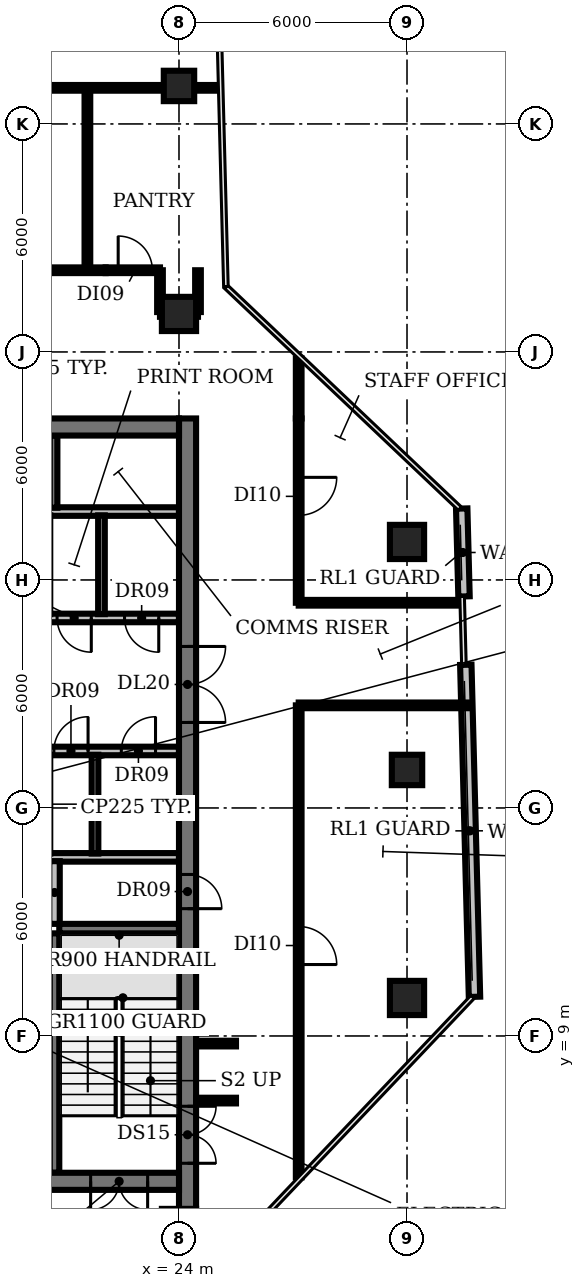
"""IFC4 building model, lengths in metres.
Left out: names, types, materials, properties, quantities, classifications, styles, units other than length and angle.
Written with IfcOpenShell. Run it as: python <this file> out.ifc"""

import sys

from ifc_helpers import new_model, si_unit, direction, frame, frame_2d, origin, origin_2d, place, context, subcontext, project, spatial, rectangle, circle, extrude, element, fill, save


model = new_model("IFC4")
c1 = context("Model", 3, precision=1e-05, world=origin(), true_north=direction((0.0, 1.0)))
c2 = subcontext(c1, "Body", "Model", "MODEL_VIEW")
j1 = project(units=[si_unit("LENGTHUNIT", "METRE"), si_unit("PLANEANGLEUNIT", "RADIAN")], contexts=[c1])
p1 = place(None, origin())
s1 = spatial("IfcSite", under=j1, at=p1, CompositionType="ELEMENT")
p2 = place(p1, origin())
s2 = spatial("IfcBuilding", under=s1, at=p2, CompositionType="ELEMENT")
p3 = place(p2, frame((0.0, 0.0, 222.2)))
s3 = spatial("IfcBuildingStorey", under=s2, at=p3, CompositionType="ELEMENT", Elevation=222.2)
p4 = place(p3, frame((24.0, 28.0, 0.0), z_axis=(0.0, 0.0, 1.0), x_axis=(1.0, 0.0, 0.0)))
e1 = element("IfcColumn", 1, at=p4, inside=s3, PredefinedType="COLUMN", context=c2, shape_type="SweptSolid", body=[
    extrude(circle(Radius=0.45, at=origin_2d()), origin(), (0.0, 0.0, 1.0), 3.85),
])
p5 = place(p3, frame((24.0, 34.0, 0.0), z_axis=(0.0, 0.0, 1.0), x_axis=(1.0, 0.0, 0.0)))
e2 = element("IfcColumn", 2, at=p5, inside=s3, PredefinedType="COLUMN", context=c2, shape_type="SweptSolid", body=[
    extrude(rectangle(XDim=0.8, YDim=0.8, at=origin_2d()), origin(), (0.0, 0.0, 1.0), 3.85),
])
p6 = place(p3, frame((30.0, 10.0, 0.0), z_axis=(0.0, 0.0, 1.0), x_axis=(1.0, 0.0, 0.0)))
e3 = element("IfcColumn", 3, at=p6, inside=s3, PredefinedType="COLUMN", context=c2, shape_type="SweptSolid", body=[
    extrude(circle(Radius=0.45, at=origin_2d()), origin(), (0.0, 0.0, 1.0), 3.85),
])
p7 = place(p3, frame((30.0, 16.0, 0.0), z_axis=(0.0, 0.0, 1.0), x_axis=(1.0, 0.0, 0.0)))
e4 = element("IfcColumn", 4, at=p7, inside=s3, PredefinedType="COLUMN", context=c2, shape_type="SweptSolid", body=[
    extrude(rectangle(XDim=0.8, YDim=0.8, at=origin_2d()), origin(), (0.0, 0.0, 1.0), 3.85),
])
p8 = place(p3, frame((30.0, 22.0, 0.0), z_axis=(0.0, 0.0, 1.0), x_axis=(1.0, 0.0, 0.0)))
e5 = element("IfcColumn", 5, at=p8, inside=s3, PredefinedType="COLUMN", context=c2, shape_type="SweptSolid", body=[
    extrude(circle(Radius=0.45, at=origin_2d()), origin(), (0.0, 0.0, 1.0), 3.85),
])
p9 = place(p3, frame((31.776, 10.03, 0.0), z_axis=(0.0, 0.0, 1.0), x_axis=(-0.026145807667, 0.999658139937, 0.0)))
e6 = element("IfcWall", 6, at=p9, inside=s3, PredefinedType="SOLIDWALL", context=c2, shape_type="SweptSolid", body=[
    extrude(rectangle(XDim=8.74, YDim=0.3, at=frame_2d((4.37, 0.0))), origin(), (0.0, 0.0, 1.0), 3.85),
])
p10 = place(p3, frame((31.5, 20.567, 0.0), z_axis=(0.0, 0.0, 1.0), x_axis=(-0.026173462756, 0.999657416242, 0.0)))
e7 = element("IfcWall", 7, at=p10, inside=s3, PredefinedType="SOLIDWALL", context=c2, shape_type="SweptSolid", body=[
    extrude(rectangle(XDim=2.313, YDim=0.3, at=frame_2d((1.157, 0.0))), origin(), (0.0, 0.0, 1.0), 3.85),
])
p11 = place(p3, frame((20.85, 11.825, 0.0), z_axis=(0.0, 0.0, 1.0), x_axis=(1.0, 0.0, 0.0)))
e8 = element("IfcWall", 8, at=p11, inside=s3, PredefinedType="SHEAR", context=c2, shape_type="SweptSolid", body=[
    extrude(rectangle(XDim=3.15, YDim=0.25, at=frame_2d((1.575, 0.0))), origin(), (0.0, 0.0, 1.0), 3.85),
])
p12 = place(p3, frame((16.6, 13.7, 0.0), z_axis=(0.0, 0.0, 1.0), x_axis=(1.0, 0.0, 0.0)))
e9 = element("IfcWall", 9, at=p12, inside=s3, PredefinedType="PARTITIONING", context=c2, shape_type="SweptSolid", body=[
    extrude(rectangle(XDim=7.4, YDim=0.225, at=frame_2d((3.7, 0.0))), origin(), (0.0, 0.0, 1.0), 3.85),
])
p13 = place(p3, frame((9.4, 16.5, 0.0), z_axis=(0.0, 0.0, 1.0), x_axis=(1.0, 0.0, 0.0)))
e10 = element("IfcWall", 10, at=p13, inside=s3, PredefinedType="PARTITIONING", context=c2, shape_type="SweptSolid", body=[
    extrude(rectangle(XDim=14.6, YDim=0.225, at=frame_2d((7.3, 0.0))), origin(), (0.0, 0.0, 1.0), 3.85),
])
p14 = place(p13, frame((1.9, 0.0, 0.0)))
e11 = element("IfcOpeningElement", 11, at=p14, cuts=e10, PredefinedType="OPENING", context=c2, shape_type="SweptSolid", body=[
    extrude(rectangle(XDim=1.0, YDim=2.1, at=frame_2d((0.5, 1.05))), frame((0.0, 0.123, 0.0), z_axis=(0.0, -1.0, 0.0), x_axis=(1.0, 0.0, 0.0)), (0.0, 0.0, 1.0), 0.245),
])
p15 = place(p13, frame((7.475, 0.0, 0.0)))
e12 = element("IfcOpeningElement", 12, at=p15, cuts=e10, PredefinedType="OPENING", context=c2, shape_type="SweptSolid", body=[
    extrude(rectangle(XDim=1.0, YDim=2.1, at=frame_2d((0.5, 1.05))), frame((0.0, 0.123, 0.0), z_axis=(0.0, -1.0, 0.0), x_axis=(1.0, 0.0, 0.0)), (0.0, 0.0, 1.0), 0.245),
])
p16 = place(p13, frame((11.308, 0.0, 0.0)))
e13 = element("IfcOpeningElement", 13, at=p16, cuts=e10, PredefinedType="OPENING", context=c2, shape_type="SweptSolid", body=[
    extrude(rectangle(XDim=0.9, YDim=2.1, at=frame_2d((0.45, 1.05))), frame((0.0, 0.123, 0.0), z_axis=(0.0, -1.0, 0.0), x_axis=(1.0, 0.0, 0.0)), (0.0, 0.0, 1.0), 0.245),
])
p17 = place(p13, frame((13.083, 0.0, 0.0)))
e14 = element("IfcOpeningElement", 14, at=p17, cuts=e10, PredefinedType="OPENING", context=c2, shape_type="SweptSolid", body=[
    extrude(rectangle(XDim=0.9, YDim=2.1, at=frame_2d((0.45, 1.05))), frame((0.0, 0.123, 0.0), z_axis=(0.0, -1.0, 0.0), x_axis=(1.0, 0.0, 0.0)), (0.0, 0.0, 1.0), 0.245),
])
p18 = place(p3, frame((24.0, 20.0, 0.0), z_axis=(0.0, 0.0, 1.0), x_axis=(-1.0, 0.0, 0.0)))
e15 = element("IfcWall", 15, at=p18, inside=s3, PredefinedType="PARTITIONING", context=c2, shape_type="SweptSolid", body=[
    extrude(rectangle(XDim=14.6, YDim=0.225, at=frame_2d((7.3, 0.0))), origin(), (0.0, 0.0, 1.0), 3.85),
])
p19 = place(p18, frame((12.75, 0.0, 0.0)))
e16 = element("IfcOpeningElement", 16, at=p19, cuts=e15, PredefinedType="OPENING", context=c2, shape_type="SweptSolid", body=[
    extrude(rectangle(XDim=1.1, YDim=2.1, at=frame_2d((0.55, 1.05))), frame((0.0, 0.123, 0.0), z_axis=(0.0, -1.0, 0.0), x_axis=(1.0, 0.0, 0.0)), (0.0, 0.0, 1.0), 0.245),
])
p20 = place(p18, frame((9.95, 0.0, 0.0)))
e17 = element("IfcOpeningElement", 17, at=p20, cuts=e15, PredefinedType="OPENING", context=c2, shape_type="SweptSolid", body=[
    extrude(rectangle(XDim=1.1, YDim=2.1, at=frame_2d((0.55, 1.05))), frame((0.0, 0.123, 0.0), z_axis=(0.0, -1.0, 0.0), x_axis=(1.0, 0.0, 0.0)), (0.0, 0.0, 1.0), 0.245),
])
p21 = place(p18, frame((7.15, 0.0, 0.0)))
e18 = element("IfcOpeningElement", 18, at=p21, cuts=e15, PredefinedType="OPENING", context=c2, shape_type="SweptSolid", body=[
    extrude(rectangle(XDim=1.1, YDim=2.1, at=frame_2d((0.55, 1.05))), frame((0.0, 0.123, 0.0), z_axis=(0.0, -1.0, 0.0), x_axis=(1.0, 0.0, 0.0)), (0.0, 0.0, 1.0), 0.245),
])
p22 = place(p18, frame((4.35, 0.0, 0.0)))
e19 = element("IfcOpeningElement", 19, at=p22, cuts=e15, PredefinedType="OPENING", context=c2, shape_type="SweptSolid", body=[
    extrude(rectangle(XDim=1.1, YDim=2.1, at=frame_2d((0.55, 1.05))), frame((0.0, 0.123, 0.0), z_axis=(0.0, -1.0, 0.0), x_axis=(1.0, 0.0, 0.0)), (0.0, 0.0, 1.0), 0.245),
])
p23 = place(p18, frame((2.308, 0.0, 0.0)))
e20 = element("IfcOpeningElement", 20, at=p23, cuts=e15, PredefinedType="OPENING", context=c2, shape_type="SweptSolid", body=[
    extrude(rectangle(XDim=0.9, YDim=2.1, at=frame_2d((0.45, 1.05))), frame((0.0, 0.123, 0.0), z_axis=(0.0, -1.0, 0.0), x_axis=(1.0, 0.0, 0.0)), (0.0, 0.0, 1.0), 0.245),
])
p24 = place(p18, frame((0.532, 0.0, 0.0)))
e21 = element("IfcOpeningElement", 21, at=p24, cuts=e15, PredefinedType="OPENING", context=c2, shape_type="SweptSolid", body=[
    extrude(rectangle(XDim=0.9, YDim=2.1, at=frame_2d((0.45, 1.05))), frame((0.0, 0.123, 0.0), z_axis=(0.0, -1.0, 0.0), x_axis=(1.0, 0.0, 0.0)), (0.0, 0.0, 1.0), 0.245),
])
p25 = place(p3, frame((9.4, 22.8, 0.0), z_axis=(0.0, 0.0, 1.0), x_axis=(1.0, 0.0, 0.0)))
e22 = element("IfcWall", 22, at=p25, inside=s3, PredefinedType="PARTITIONING", context=c2, shape_type="SweptSolid", body=[
    extrude(rectangle(XDim=14.6, YDim=0.225, at=frame_2d((7.3, 0.0))), origin(), (0.0, 0.0, 1.0), 3.85),
])
p26 = place(p3, frame((20.7, 22.9, 0.0), z_axis=(0.0, 0.0, 1.0), x_axis=(0.0, 1.0, 0.0)))
e23 = element("IfcWall", 23, at=p26, inside=s3, PredefinedType="SHEAR", context=c2, shape_type="SweptSolid", body=[
    extrude(rectangle(XDim=1.9, YDim=0.2, at=frame_2d((0.95, 0.0))), origin(), (0.0, 0.0, 1.0), 3.85),
])
p27 = place(p3, frame((20.725, 5.4, 0.0), z_axis=(0.0, 0.0, 1.0), x_axis=(0.0, 1.0, 0.0)))
e24 = element("IfcWall", 24, at=p27, inside=s3, PredefinedType="SHEAR", context=c2, shape_type="SweptSolid", body=[
    extrude(rectangle(XDim=6.3, YDim=0.25, at=frame_2d((3.15, 0.0))), origin(), (0.0, 0.0, 1.0), 3.85),
])
p28 = place(p3, frame((20.725, 11.95, 0.0), z_axis=(0.0, 0.0, 1.0), x_axis=(0.0, 1.0, 0.0)))
e25 = element("IfcWall", 25, at=p28, inside=s3, PredefinedType="PARTITIONING", context=c2, shape_type="SweptSolid", body=[
    extrude(rectangle(XDim=1.65, YDim=0.275, at=frame_2d((0.825, 0.0))), origin(), (0.0, 0.0, 1.0), 3.85),
])
for number, where, z_axis, x_axis in (
    (26, (21.79, 13.8, 0.0), (0.0, 0.0, 1.0), (0.0, 1.0, 0.0)),
    (27, (21.96, 20.1, 0.0), (0.0, 0.0, 1.0), (0.0, 1.0, 0.0)),
):
    element("IfcWall", number, at=place(p3, frame(where, z_axis=z_axis, x_axis=x_axis)), inside=s3, PredefinedType="PARTITIONING", context=c2, shape_type="SweptSolid", body=[
        extrude(rectangle(XDim=2.6, YDim=0.175, at=frame_2d((1.3, 0.0))), origin(), (0.0, 0.0, 1.0), 3.85),
    ])
p29 = place(p3, frame((24.225, 25.25, 0.0), z_axis=(0.0, 0.0, 1.0), x_axis=(0.0, -1.0, 0.0)))
e28 = element("IfcWall", 28, at=p29, inside=s3, PredefinedType="SHEAR", context=c2, shape_type="SweptSolid", body=[
    extrude(rectangle(XDim=20.83, YDim=0.45, at=frame_2d((10.415, 0.0))), origin(), (0.0, 0.0, 1.0), 3.85),
])
p30 = place(p29, frame((18.1, 0.0, 0.0)))
e29 = element("IfcOpeningElement", 29, at=p30, cuts=e28, PredefinedType="OPENING", context=c2, shape_type="SweptSolid", body=[
    extrude(rectangle(XDim=1.5, YDim=2.1, at=frame_2d((0.75, 1.05))), frame((0.0, 0.235, 0.0), z_axis=(0.0, -1.0, 0.0), x_axis=(1.0, 0.0, 0.0)), (0.0, 0.0, 1.0), 0.47),
])
p31 = place(p29, frame((12.0, 0.0, 0.0)))
e30 = element("IfcOpeningElement", 30, at=p31, cuts=e28, PredefinedType="OPENING", context=c2, shape_type="SweptSolid", body=[
    extrude(rectangle(XDim=0.9, YDim=2.1, at=frame_2d((0.45, 1.05))), frame((0.0, 0.235, 0.0), z_axis=(0.0, -1.0, 0.0), x_axis=(1.0, 0.0, 0.0)), (0.0, 0.0, 1.0), 0.47),
])
p32 = place(p29, frame((6.0, 0.0, 0.0)))
e31 = element("IfcOpeningElement", 31, at=p32, cuts=e28, PredefinedType="OPENING", context=c2, shape_type="SweptSolid", body=[
    extrude(rectangle(XDim=2.0, YDim=2.1, at=frame_2d((1.0, 1.05))), frame((0.0, 0.235, 0.0), z_axis=(0.0, -1.0, 0.0), x_axis=(1.0, 0.0, 0.0)), (0.0, 0.0, 1.0), 0.47),
])
p33 = place(p3, frame((24.0, 5.175, 0.0), z_axis=(0.0, 0.0, 1.0), x_axis=(-1.0, 0.0, 0.0)))
e32 = element("IfcWall", 32, at=p33, inside=s3, PredefinedType="SHEAR", context=c2, shape_type="SweptSolid", body=[
    extrude(rectangle(XDim=18.0, YDim=0.45, at=frame_2d((9.0, 0.0))), origin(), (0.0, 0.0, 1.0), 3.85),
])
p34 = place(p33, frame((0.825, 0.0, 0.0)))
e33 = element("IfcOpeningElement", 33, at=p34, cuts=e32, PredefinedType="OPENING", context=c2, shape_type="SweptSolid", body=[
    extrude(rectangle(XDim=1.5, YDim=2.1, at=frame_2d((0.75, 1.05))), frame((0.0, 0.235, 0.0), z_axis=(0.0, -1.0, 0.0), x_axis=(1.0, 0.0, 0.0)), (0.0, 0.0, 1.0), 0.47),
])
p35 = place(p33, frame((15.675, 0.0, 0.0)))
e34 = element("IfcOpeningElement", 34, at=p35, cuts=e32, PredefinedType="OPENING", context=c2, shape_type="SweptSolid", body=[
    extrude(rectangle(XDim=1.5, YDim=2.1, at=frame_2d((0.75, 1.05))), frame((0.0, 0.235, 0.0), z_axis=(0.0, -1.0, 0.0), x_axis=(1.0, 0.0, 0.0)), (0.0, 0.0, 1.0), 0.47),
])
p36 = place(p33, frame((13.0, 0.0, 0.0)))
e35 = element("IfcOpeningElement", 35, at=p36, cuts=e32, PredefinedType="OPENING", context=c2, shape_type="SweptSolid", body=[
    extrude(rectangle(XDim=1.2, YDim=2.1, at=frame_2d((0.6, 1.05))), frame((0.0, 0.235, 0.0), z_axis=(0.0, -1.0, 0.0), x_axis=(1.0, 0.0, 0.0)), (0.0, 0.0, 1.0), 0.47),
])
p37 = place(p33, frame((4.4, 0.0, 0.0)))
e36 = element("IfcOpeningElement", 36, at=p37, cuts=e32, PredefinedType="OPENING", context=c2, shape_type="SweptSolid", body=[
    extrude(rectangle(XDim=1.0, YDim=2.1, at=frame_2d((0.5, 1.05))), frame((0.0, 0.235, 0.0), z_axis=(0.0, -1.0, 0.0), x_axis=(1.0, 0.0, 0.0)), (0.0, 0.0, 1.0), 0.47),
])
p38 = place(p3, frame((6.0, 25.025, 0.0), z_axis=(0.0, 0.0, 1.0), x_axis=(1.0, 0.0, 0.0)))
e37 = element("IfcWall", 37, at=p38, inside=s3, PredefinedType="SHEAR", context=c2, shape_type="SweptSolid", body=[
    extrude(rectangle(XDim=18.0, YDim=0.45, at=frame_2d((9.0, 0.0))), origin(), (0.0, 0.0, 1.0), 3.85),
])
p39 = place(p3, frame((12.42, 33.95, 0.0), z_axis=(0.0, 0.0, 1.0), x_axis=(1.0, 0.0, 0.0)))
e38 = element("IfcWall", 38, at=p39, inside=s3, PredefinedType="PARTITIONING", context=c2, shape_type="SweptSolid", body=[
    extrude(rectangle(XDim=12.63, YDim=0.15, at=frame_2d((6.315, 0.0))), origin(), (0.0, 0.0, 1.0), 2.88),
])
p40 = place(p3, frame((18.4, 29.15, 0.0), z_axis=(0.0, 0.0, 1.0), x_axis=(1.0, 0.0, 0.0)))
e39 = element("IfcWall", 39, at=p40, inside=s3, PredefinedType="PARTITIONING", context=c2, shape_type="SweptSolid", body=[
    extrude(rectangle(XDim=3.67, YDim=0.15, at=frame_2d((1.835, 0.0))), origin(), (0.0, 0.0, 1.0), 2.88),
])
p41 = place(p3, frame((21.59, 29.15, 0.0), z_axis=(0.0, 0.0, 1.0), x_axis=(0.0, 1.0, 0.0)))
e40 = element("IfcWall", 40, at=p41, inside=s3, PredefinedType="PARTITIONING", context=c2, shape_type="SweptSolid", body=[
    extrude(rectangle(XDim=4.8, YDim=0.15, at=frame_2d((2.4, 0.0))), origin(), (0.0, 0.0, 1.0), 2.88),
])
p42 = place(p3, frame((22.07, 29.15, 0.0), z_axis=(0.0, 0.0, 1.0), x_axis=(1.0, 0.0, 0.0)))
e41 = element("IfcWall", 41, at=p42, inside=s3, PredefinedType="PARTITIONING", context=c2, shape_type="SweptSolid", body=[
    extrude(rectangle(XDim=1.43, YDim=0.15, at=frame_2d((0.715, 0.0))), origin(), (0.0, 0.0, 1.0), 2.88),
])
p43 = place(p42, frame((0.33, 0.0, 0.0)))
e42 = element("IfcOpeningElement", 42, at=p43, cuts=e41, PredefinedType="OPENING", context=c2, shape_type="SweptSolid", body=[
    extrude(rectangle(XDim=0.9, YDim=2.1, at=frame_2d((0.45, 1.05))), frame((0.0, 0.085, 0.0), z_axis=(0.0, -1.0, 0.0), x_axis=(1.0, 0.0, 0.0)), (0.0, 0.0, 1.0), 0.17),
])
p44 = place(p3, frame((23.5, 28.0, 0.0), z_axis=(0.0, 0.0, 1.0), x_axis=(1.0, 0.0, 0.0)))
e43 = element("IfcWall", 43, at=p44, inside=s3, PredefinedType="PARTITIONING", context=c2, shape_type="SweptSolid", body=[
    extrude(rectangle(XDim=1.0, YDim=0.15, at=frame_2d((0.5, 0.0))), origin(), (0.0, 0.0, 1.0), 2.88),
])
p45 = place(p3, frame((23.5, 28.05, 0.0), z_axis=(0.0, 0.0, 1.0), x_axis=(0.0, 1.0, 0.0)))
e44 = element("IfcWall", 44, at=p45, inside=s3, PredefinedType="PARTITIONING", context=c2, shape_type="SweptSolid", body=[
    extrude(rectangle(XDim=1.1, YDim=0.15, at=frame_2d((0.55, 0.0))), origin(), (0.0, 0.0, 1.0), 2.88),
])
for number, where, z_axis, x_axis in (
    (45, (24.45, 7.3, 0.0), (0.0, 0.0, 1.0), (1.0, 0.0, 0.0)),
    (46, (24.45, 8.8, 0.0), (0.0, 0.0, 1.0), (1.0, 0.0, 0.0)),
):
    element("IfcWall", number, at=place(p3, frame(where, z_axis=z_axis, x_axis=x_axis)), inside=s3, PredefinedType="PARTITIONING", context=c2, shape_type="SweptSolid", body=[
        extrude(rectangle(XDim=1.05, YDim=0.15, at=frame_2d((0.525, 0.0))), origin(), (0.0, 0.0, 1.0), 2.88),
    ])
p46 = place(p3, frame((24.5, 28.05, 0.0), z_axis=(0.0, 0.0, 1.0), x_axis=(0.0, 1.0, 0.0)))
e47 = element("IfcWall", 47, at=p46, inside=s3, PredefinedType="PARTITIONING", context=c2, shape_type="SweptSolid", body=[
    extrude(rectangle(XDim=1.1, YDim=0.15, at=frame_2d((0.55, 0.0))), origin(), (0.0, 0.0, 1.0), 2.88),
])
p47 = place(p3, frame((27.15, 17.7, 0.0), z_axis=(0.0, 0.0, 1.0), x_axis=(0.0, -1.0, 0.0)))
e48 = element("IfcWall", 48, at=p47, inside=s3, PredefinedType="PARTITIONING", context=c2, shape_type="SweptSolid", body=[
    extrude(rectangle(XDim=12.42, YDim=0.15, at=frame_2d((6.21, 0.0))), origin(), (0.0, 0.0, 1.0), 2.88),
])
p48 = place(p47, frame((5.82, 0.0, 0.0)))
e49 = element("IfcOpeningElement", 49, at=p48, cuts=e48, PredefinedType="OPENING", context=c2, shape_type="SweptSolid", body=[
    extrude(rectangle(XDim=1.0, YDim=2.1, at=frame_2d((0.5, 1.05))), frame((0.0, 0.085, 0.0), z_axis=(0.0, -1.0, 0.0), x_axis=(1.0, 0.0, 0.0)), (0.0, 0.0, 1.0), 0.17),
])
p49 = place(p3, frame((27.15, 17.7, 0.0), z_axis=(0.0, 0.0, 1.0), x_axis=(1.0, 0.0, 0.0)))
e50 = element("IfcWall", 50, at=p49, inside=s3, PredefinedType="PARTITIONING", context=c2, shape_type="SweptSolid", body=[
    extrude(rectangle(XDim=4.435, YDim=0.15, at=frame_2d((2.218, 0.0))), origin(), (0.0, 0.0, 1.0), 2.88),
])
p50 = place(p3, frame((27.15, 20.4, 0.0), z_axis=(0.0, 0.0, 1.0), x_axis=(1.0, 0.0, 0.0)))
e51 = element("IfcWall", 51, at=p50, inside=s3, PredefinedType="PARTITIONING", context=c2, shape_type="SweptSolid", body=[
    extrude(rectangle(XDim=4.236, YDim=0.15, at=frame_2d((2.118, 0.0))), origin(), (0.0, 0.0, 1.0), 2.88),
])
p51 = place(p3, frame((27.15, 25.25, 0.0), z_axis=(0.0, 0.0, 1.0), x_axis=(0.0, -1.0, 0.0)))
e52 = element("IfcWall", 52, at=p51, inside=s3, PredefinedType="PARTITIONING", context=c2, shape_type="SweptSolid", body=[
    extrude(rectangle(XDim=4.85, YDim=0.15, at=frame_2d((2.425, 0.0))), origin(), (0.0, 0.0, 1.0), 2.88),
])
p52 = place(p51, frame((1.55, 0.0, 0.0)))
e53 = element("IfcOpeningElement", 53, at=p52, cuts=e52, PredefinedType="OPENING", context=c2, shape_type="SweptSolid", body=[
    extrude(rectangle(XDim=1.0, YDim=2.1, at=frame_2d((0.5, 1.05))), frame((0.0, 0.085, 0.0), z_axis=(0.0, -1.0, 0.0), x_axis=(1.0, 0.0, 0.0)), (0.0, 0.0, 1.0), 0.17),
])
p53 = place(p3, frame((27.15, 25.25, 0.0), z_axis=(0.0, 0.0, 1.0), x_axis=(0.0, 1.0, 0.0)))
e54 = element("IfcWall", 54, at=p53, inside=s3, PredefinedType="PARTITIONING", context=c2, shape_type="SweptSolid", body=[
    extrude(rectangle(XDim=1.58, YDim=0.15, at=frame_2d((0.79, 0.0))), origin(), (0.0, 0.0, 1.0), 2.88),
])
p54 = place(p16, origin())
e55 = element("IfcDoor", 55, at=p54, inside=s3, OperationType="SINGLE_SWING_RIGHT", PredefinedType="DOOR", context=c2, shape_type="SweptSolid", body=[
    extrude(rectangle(XDim=0.9, YDim=2.1, at=frame_2d((0.45, 1.05))), frame((0.0, 0.025, 0.0), z_axis=(0.0, -1.0, 0.0), x_axis=(1.0, 0.0, 0.0)), (0.0, 0.0, 1.0), 0.05),
])
fill(e13, e55)
p55 = place(p17, origin())
e56 = element("IfcDoor", 56, at=p55, inside=s3, OperationType="SINGLE_SWING_RIGHT", PredefinedType="DOOR", context=c2, shape_type="SweptSolid", body=[
    extrude(rectangle(XDim=0.9, YDim=2.1, at=frame_2d((0.45, 1.05))), frame((0.0, 0.025, 0.0), z_axis=(0.0, -1.0, 0.0), x_axis=(1.0, 0.0, 0.0)), (0.0, 0.0, 1.0), 0.05),
])
fill(e14, e56)
p56 = place(p23, origin())
e57 = element("IfcDoor", 57, at=p56, inside=s3, OperationType="SINGLE_SWING_LEFT", PredefinedType="DOOR", context=c2, shape_type="SweptSolid", body=[
    extrude(rectangle(XDim=0.9, YDim=2.1, at=frame_2d((0.45, 1.05))), frame((0.0, 0.025, 0.0), z_axis=(0.0, -1.0, 0.0), x_axis=(1.0, 0.0, 0.0)), (0.0, 0.0, 1.0), 0.05),
])
fill(e20, e57)
p57 = place(p24, origin())
e58 = element("IfcDoor", 58, at=p57, inside=s3, OperationType="SINGLE_SWING_LEFT", PredefinedType="DOOR", context=c2, shape_type="SweptSolid", body=[
    extrude(rectangle(XDim=0.9, YDim=2.1, at=frame_2d((0.45, 1.05))), frame((0.0, 0.025, 0.0), z_axis=(0.0, -1.0, 0.0), x_axis=(1.0, 0.0, 0.0)), (0.0, 0.0, 1.0), 0.05),
])
fill(e21, e58)
p58 = place(p30, origin())
e59 = element("IfcDoor", 59, at=p58, inside=s3, OperationType="DOUBLE_DOOR_SINGLE_SWING", PredefinedType="DOOR", context=c2, shape_type="SweptSolid", body=[
    extrude(rectangle(XDim=1.5, YDim=2.1, at=frame_2d((0.75, 1.05))), frame((0.0, 0.025, 0.0), z_axis=(0.0, -1.0, 0.0), x_axis=(1.0, 0.0, 0.0)), (0.0, 0.0, 1.0), 0.05),
])
fill(e29, e59)
p59 = place(p31, origin())
e60 = element("IfcDoor", 60, at=p59, inside=s3, OperationType="SINGLE_SWING_RIGHT", PredefinedType="DOOR", context=c2, shape_type="SweptSolid", body=[
    extrude(rectangle(XDim=0.9, YDim=2.1, at=frame_2d((0.45, 1.05))), frame((0.0, 0.025, 0.0), z_axis=(0.0, -1.0, 0.0), x_axis=(1.0, 0.0, 0.0)), (0.0, 0.0, 1.0), 0.05),
])
fill(e30, e60)
p60 = place(p32, origin())
e61 = element("IfcDoor", 61, at=p60, inside=s3, OperationType="DOUBLE_DOOR_SINGLE_SWING", PredefinedType="DOOR", context=c2, shape_type="SweptSolid", body=[
    extrude(rectangle(XDim=2.0, YDim=2.1, at=frame_2d((1.0, 1.05))), frame((0.0, 0.025, 0.0), z_axis=(0.0, -1.0, 0.0), x_axis=(1.0, 0.0, 0.0)), (0.0, 0.0, 1.0), 0.05),
])
fill(e31, e61)
p61 = place(p34, origin())
e62 = element("IfcDoor", 62, at=p61, inside=s3, OperationType="DOUBLE_DOOR_SINGLE_SWING", PredefinedType="DOOR", context=c2, shape_type="SweptSolid", body=[
    extrude(rectangle(XDim=1.5, YDim=2.1, at=frame_2d((0.75, 1.05))), frame((0.0, 0.025, 0.0), z_axis=(0.0, -1.0, 0.0), x_axis=(1.0, 0.0, 0.0)), (0.0, 0.0, 1.0), 0.05),
])
fill(e33, e62)
p62 = place(p43, origin())
e63 = element("IfcDoor", 63, at=p62, inside=s3, OperationType="SINGLE_SWING_LEFT", PredefinedType="DOOR", context=c2, shape_type="SweptSolid", body=[
    extrude(rectangle(XDim=0.9, YDim=2.1, at=frame_2d((0.45, 1.05))), frame((0.0, 0.025, 0.0), z_axis=(0.0, -1.0, 0.0), x_axis=(1.0, 0.0, 0.0)), (0.0, 0.0, 1.0), 0.05),
])
fill(e42, e63)
p63 = place(p48, origin())
e64 = element("IfcDoor", 64, at=p63, inside=s3, OperationType="SINGLE_SWING_RIGHT", PredefinedType="DOOR", context=c2, shape_type="SweptSolid", body=[
    extrude(rectangle(XDim=1.0, YDim=2.1, at=frame_2d((0.5, 1.05))), frame((0.0, 0.025, 0.0), z_axis=(0.0, -1.0, 0.0), x_axis=(1.0, 0.0, 0.0)), (0.0, 0.0, 1.0), 0.05),
])
fill(e49, e64)
p64 = place(p52, origin())
e65 = element("IfcDoor", 65, at=p64, inside=s3, OperationType="SINGLE_SWING_LEFT", PredefinedType="DOOR", context=c2, shape_type="SweptSolid", body=[
    extrude(rectangle(XDim=1.0, YDim=2.1, at=frame_2d((0.5, 1.05))), frame((0.0, 0.025, 0.0), z_axis=(0.0, -1.0, 0.0), x_axis=(1.0, 0.0, 0.0)), (0.0, 0.0, 1.0), 0.05),
])
fill(e53, e65)
save(model, sys.argv[1])
